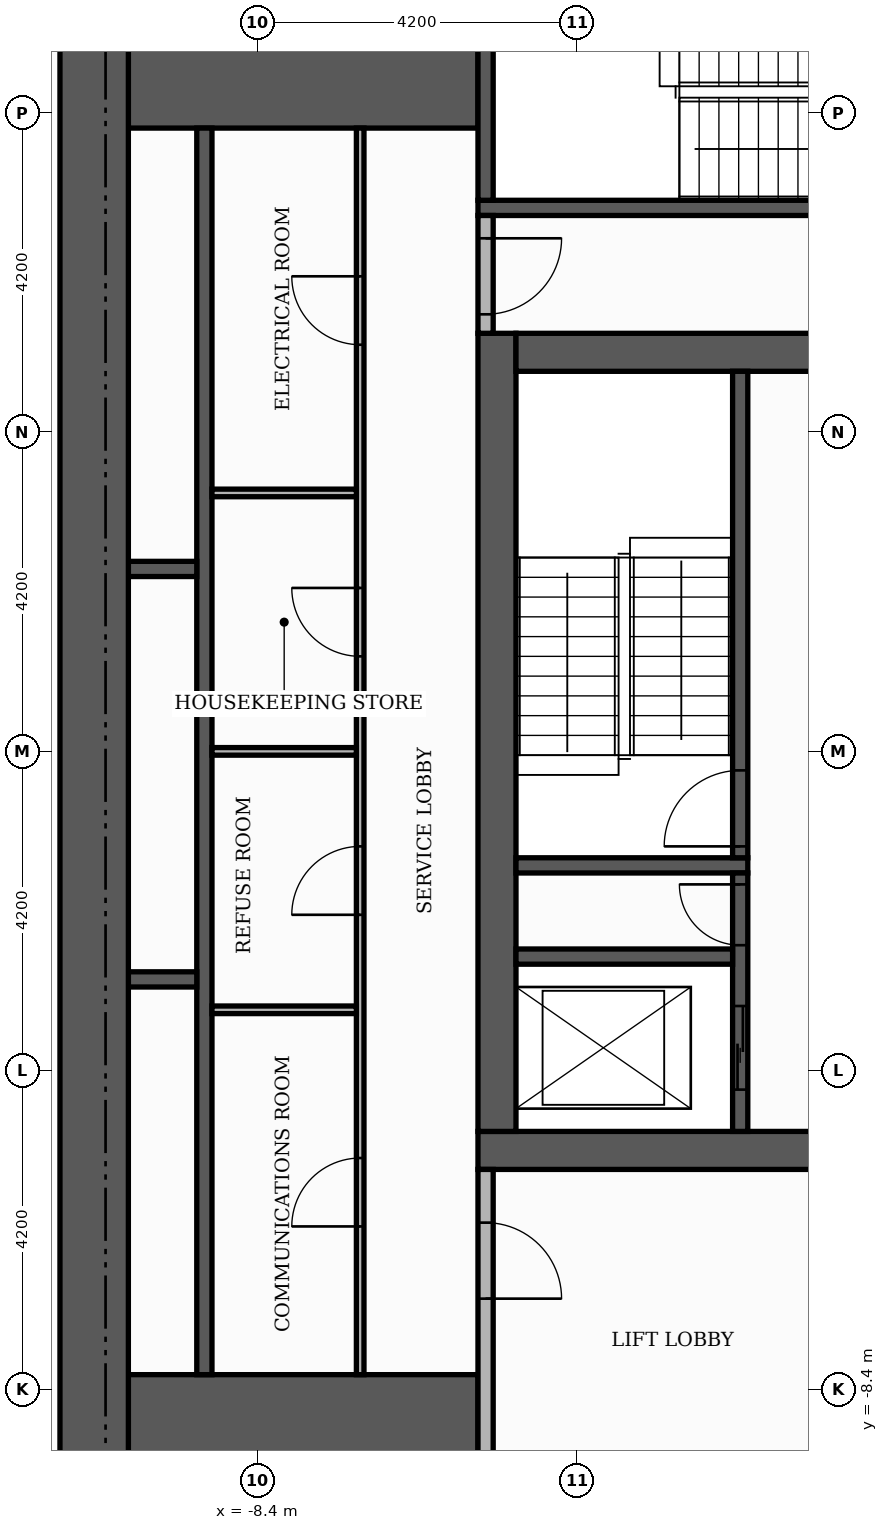
"""IFC4 building model, lengths in metres.
Left out: names, types, materials, properties, quantities, classifications, styles, units other than length and angle.
Written with IfcOpenShell. Run it as: python <this file> out.ifc"""

import sys

from ifc_helpers import new_model, si_unit, direction, frame, frame_2d, origin, place, context, subcontext, project, spatial, rectangle, extrude, element, fill, save


model = new_model("IFC4")
c1 = context("Model", 3, precision=1e-05, world=origin(), true_north=direction((0.0, 1.0)))
c2 = subcontext(c1, "Body", "Model", "MODEL_VIEW")
j1 = project(units=[si_unit("LENGTHUNIT", "METRE"), si_unit("PLANEANGLEUNIT", "RADIAN")], contexts=[c1])
p1 = place(None, origin())
s1 = spatial("IfcSite", under=j1, at=p1, CompositionType="ELEMENT")
p2 = place(p1, origin())
s2 = spatial("IfcBuilding", under=s1, at=p2, CompositionType="ELEMENT")
p3 = place(p2, frame((0.0, 0.0, 215.7)))
s3 = spatial("IfcBuildingStorey", under=s2, at=p3, CompositionType="ELEMENT", Elevation=215.7)
p4 = place(p3, frame((-5.5, -5.25, 0.0), z_axis=(0.0, 0.0, 1.0), x_axis=(1.0, 0.0, 0.0)))
e1 = element("IfcWall", 1, at=p4, inside=s3, PredefinedType="SHEAR", context=c2, shape_type="SweptSolid", body=[
    extrude(rectangle(XDim=11.0, YDim=0.5, at=frame_2d((5.5, 0.0))), origin(), (0.0, 0.0, 1.0), 3.48),
])
p5 = place(p4, frame((4.9, 0.0, 0.0)))
e2 = element("IfcOpeningElement", 2, at=p5, cuts=e1, PredefinedType="OPENING", context=c2, shape_type="SweptSolid", body=[
    extrude(rectangle(XDim=1.2, YDim=2.1, at=frame_2d((0.6, 1.05))), frame((0.0, 0.26, 0.0), z_axis=(0.0, -1.0, 0.0), x_axis=(1.0, 0.0, 0.0)), (0.0, 0.0, 1.0), 0.52),
])
p6 = place(p3, frame((-5.25, -5.0, 0.0), z_axis=(0.0, 0.0, 1.0), x_axis=(0.0, 1.0, 0.0)))
e3 = element("IfcWall", 3, at=p6, inside=s3, PredefinedType="SHEAR", context=c2, shape_type="SweptSolid", body=[
    extrude(rectangle(XDim=10.5, YDim=0.5, at=frame_2d((5.25, 0.0))), origin(), (0.0, 0.0, 1.0), 3.48),
])
p7 = place(p3, frame((-5.0, 5.25, 0.0), z_axis=(0.0, 0.0, 1.0), x_axis=(1.0, 0.0, 0.0)))
e4 = element("IfcWall", 4, at=p7, inside=s3, PredefinedType="SHEAR", context=c2, shape_type="SweptSolid", body=[
    extrude(rectangle(XDim=10.0, YDim=0.5, at=frame_2d((5.0, 0.0))), origin(), (0.0, 0.0, 1.0), 3.48),
])
p8 = place(p7, frame((4.4, 0.0, 0.0)))
e5 = element("IfcOpeningElement", 5, at=p8, cuts=e4, PredefinedType="OPENING", context=c2, shape_type="SweptSolid", body=[
    extrude(rectangle(XDim=1.2, YDim=2.1, at=frame_2d((0.6, 1.05))), frame((0.0, 0.26, 0.0), z_axis=(0.0, -1.0, 0.0), x_axis=(1.0, 0.0, 0.0)), (0.0, 0.0, 1.0), 0.52),
])
for number, where, z_axis, x_axis in (
    (6, (-10.1, -9.15, 0.0), (0.0, 0.0, 1.0), (1.0, 0.0, 0.0)),
    (7, (-10.1, 9.15, 0.0), (0.0, 0.0, 1.0), (1.0, 0.0, 0.0)),
):
    element("IfcWall", number, at=place(p3, frame(where, z_axis=z_axis, x_axis=x_axis)), inside=s3, PredefinedType="SHEAR", context=c2, shape_type="SweptSolid", body=[
        extrude(rectangle(XDim=4.6, YDim=1.9, at=frame_2d((2.3, 0.0))), origin(), (0.0, 0.0, 1.0), 3.48),
    ])
p9 = place(p3, frame((-5.0, -1.5, 0.0), z_axis=(0.0, 0.0, 1.0), x_axis=(1.0, 0.0, 0.0)))
e8 = element("IfcWall", 8, at=p9, inside=s3, PredefinedType="SHEAR", context=c2, shape_type="SweptSolid", body=[
    extrude(rectangle(XDim=3.05, YDim=0.2, at=frame_2d((1.525, 0.0))), origin(), (0.0, 0.0, 1.0), 3.48),
])
p10 = place(p3, frame((-2.05, -1.4, 0.0), z_axis=(0.0, 0.0, 1.0), x_axis=(0.0, 1.0, 0.0)))
e9 = element("IfcWall", 9, at=p10, inside=s3, PredefinedType="SHEAR", context=c2, shape_type="SweptSolid", body=[
    extrude(rectangle(XDim=6.4, YDim=0.2, at=frame_2d((3.2, 0.0))), origin(), (0.0, 0.0, 1.0), 3.48),
])
p11 = place(p10, frame((0.15, 0.0, 0.0)))
e10 = element("IfcOpeningElement", 10, at=p11, cuts=e9, PredefinedType="OPENING", context=c2, shape_type="SweptSolid", body=[
    extrude(rectangle(XDim=1.0, YDim=2.1, at=frame_2d((0.5, 1.05))), frame((0.0, 0.11, 0.0), z_axis=(0.0, -1.0, 0.0), x_axis=(1.0, 0.0, 0.0)), (0.0, 0.0, 1.0), 0.22),
])
p12 = place(p3, frame((-5.5, 7.15, 0.0), z_axis=(0.0, 0.0, 1.0), x_axis=(1.0, 0.0, 0.0)))
e11 = element("IfcWall", 11, at=p12, inside=s3, PredefinedType="SHEAR", context=c2, shape_type="SweptSolid", body=[
    extrude(rectangle(XDim=6.8, YDim=0.2, at=frame_2d((3.4, 0.0))), origin(), (0.0, 0.0, 1.0), 3.48),
])
p13 = place(p3, frame((-5.4, 7.25, 0.0), z_axis=(0.0, 0.0, 1.0), x_axis=(0.0, 1.0, 0.0)))
e12 = element("IfcWall", 12, at=p13, inside=s3, PredefinedType="SHEAR", context=c2, shape_type="SweptSolid", body=[
    extrude(rectangle(XDim=2.85, YDim=0.2, at=frame_2d((1.425, 0.0))), origin(), (0.0, 0.0, 1.0), 3.48),
])
p14 = place(p3, frame((-9.1, -8.2, 0.0), z_axis=(0.0, 0.0, 1.0), x_axis=(0.0, 1.0, 0.0)))
e13 = element("IfcWall", 13, at=p14, inside=s3, PredefinedType="SHEAR", context=c2, shape_type="SweptSolid", body=[
    extrude(rectangle(XDim=16.4, YDim=0.2, at=frame_2d((8.2, 0.0))), origin(), (0.0, 0.0, 1.0), 3.48),
])
p15 = place(p3, frame((-2.05, -5.0, 0.0), z_axis=(0.0, 0.0, 1.0), x_axis=(0.0, 1.0, 0.0)))
e14 = element("IfcWall", 14, at=p15, inside=s3, PredefinedType="SHEAR", context=c2, shape_type="SweptSolid", body=[
    extrude(rectangle(XDim=3.4, YDim=0.2, at=frame_2d((1.7, 0.0))), origin(), (0.0, 0.0, 1.0), 3.48),
])
p16 = place(p15, frame((0.55, 0.0, 0.0)))
e15 = element("IfcOpeningElement", 15, at=p16, cuts=e14, PredefinedType="OPENING", context=c2, shape_type="SweptSolid", body=[
    extrude(rectangle(XDim=1.1, YDim=2.1, at=frame_2d((0.55, 1.05))), frame((0.0, 0.11, 0.0), z_axis=(0.0, -1.0, 0.0), x_axis=(1.0, 0.0, 0.0)), (0.0, 0.0, 1.0), 0.22),
])
p17 = place(p15, frame((2.45, 0.0, 0.0)))
e16 = element("IfcOpeningElement", 16, at=p17, cuts=e14, PredefinedType="OPENING", context=c2, shape_type="SweptSolid", body=[
    extrude(rectangle(XDim=0.8, YDim=2.1, at=frame_2d((0.4, 1.05))), frame((0.0, 0.11, 0.0), z_axis=(0.0, -1.0, 0.0), x_axis=(1.0, 0.0, 0.0)), (0.0, 0.0, 1.0), 0.22),
])
p18 = place(p3, frame((-10.1, -3.0, 0.0), z_axis=(0.0, 0.0, 1.0), x_axis=(1.0, 0.0, 0.0)))
e17 = element("IfcWall", 17, at=p18, inside=s3, PredefinedType="SHEAR", context=c2, shape_type="SweptSolid", body=[
    extrude(rectangle(XDim=0.9, YDim=0.2, at=frame_2d((0.45, 0.0))), origin(), (0.0, 0.0, 1.0), 3.48),
])
p19 = place(p3, frame((-5.0, -2.7, 0.0), z_axis=(0.0, 0.0, 1.0), x_axis=(1.0, 0.0, 0.0)))
e18 = element("IfcWall", 18, at=p19, inside=s3, PredefinedType="SHEAR", context=c2, shape_type="SweptSolid", body=[
    extrude(rectangle(XDim=2.85, YDim=0.2, at=frame_2d((1.425, 0.0))), origin(), (0.0, 0.0, 1.0), 3.48),
])
p20 = place(p3, frame((-10.1, 2.4, 0.0), z_axis=(0.0, 0.0, 1.0), x_axis=(1.0, 0.0, 0.0)))
e19 = element("IfcWall", 19, at=p20, inside=s3, PredefinedType="SHEAR", context=c2, shape_type="SweptSolid", body=[
    extrude(rectangle(XDim=0.9, YDim=0.2, at=frame_2d((0.45, 0.0))), origin(), (0.0, 0.0, 1.0), 3.48),
])
p21 = place(p3, frame((-10.55, -10.1, 0.0), z_axis=(0.0, 0.0, 1.0), x_axis=(0.0, 1.0, 0.0)))
e20 = element("IfcWall", 20, at=p21, inside=s3, PredefinedType="SHEAR", context=c2, shape_type="SweptSolid", body=[
    extrude(rectangle(XDim=20.2, YDim=0.9, at=frame_2d((10.1, 0.0))), origin(), (0.0, 0.0, 1.0), 3.48),
])
p22 = place(p3, frame((-5.4, -10.1, 0.0), z_axis=(0.0, 0.0, 1.0), x_axis=(0.0, 1.0, 0.0)))
e21 = element("IfcWall", 21, at=p22, inside=s3, PredefinedType="PARTITIONING", context=c2, shape_type="SweptSolid", body=[
    extrude(rectangle(XDim=4.6, YDim=0.2, at=frame_2d((2.3, 0.0))), origin(), (0.0, 0.0, 1.0), 3.48),
])
p23 = place(p22, frame((2.9, 0.0, 0.0)))
e22 = element("IfcOpeningElement", 22, at=p23, cuts=e21, PredefinedType="OPENING", context=c2, shape_type="SweptSolid", body=[
    extrude(rectangle(XDim=1.0, YDim=2.1, at=frame_2d((0.5, 1.05))), frame((0.0, 0.11, 0.0), z_axis=(0.0, -1.0, 0.0), x_axis=(1.0, 0.0, 0.0)), (0.0, 0.0, 1.0), 0.22),
])
p24 = place(p3, frame((-7.05, -8.2, 0.0), z_axis=(0.0, 0.0, 1.0), x_axis=(0.0, 1.0, 0.0)))
e23 = element("IfcWall", 23, at=p24, inside=s3, PredefinedType="PARTITIONING", context=c2, shape_type="SweptSolid", body=[
    extrude(rectangle(XDim=16.4, YDim=0.1, at=frame_2d((8.2, 0.0))), origin(), (0.0, 0.0, 1.0), 3.48),
])
p25 = place(p24, frame((1.95, 0.0, 0.0)))
e24 = element("IfcOpeningElement", 24, at=p25, cuts=e23, PredefinedType="OPENING", context=c2, shape_type="SweptSolid", body=[
    extrude(rectangle(XDim=0.9, YDim=2.1, at=frame_2d((0.45, 1.05))), frame((0.0, 0.06, 0.0), z_axis=(0.0, -1.0, 0.0), x_axis=(1.0, 0.0, 0.0)), (0.0, 0.0, 1.0), 0.12),
])
p26 = place(p24, frame((6.05, 0.0, 0.0)))
e25 = element("IfcOpeningElement", 25, at=p26, cuts=e23, PredefinedType="OPENING", context=c2, shape_type="SweptSolid", body=[
    extrude(rectangle(XDim=0.9, YDim=2.1, at=frame_2d((0.45, 1.05))), frame((0.0, 0.06, 0.0), z_axis=(0.0, -1.0, 0.0), x_axis=(1.0, 0.0, 0.0)), (0.0, 0.0, 1.0), 0.12),
])
p27 = place(p24, frame((9.45, 0.0, 0.0)))
e26 = element("IfcOpeningElement", 26, at=p27, cuts=e23, PredefinedType="OPENING", context=c2, shape_type="SweptSolid", body=[
    extrude(rectangle(XDim=0.9, YDim=2.1, at=frame_2d((0.45, 1.05))), frame((0.0, 0.06, 0.0), z_axis=(0.0, -1.0, 0.0), x_axis=(1.0, 0.0, 0.0)), (0.0, 0.0, 1.0), 0.12),
])
p28 = place(p24, frame((13.55, 0.0, 0.0)))
e27 = element("IfcOpeningElement", 27, at=p28, cuts=e23, PredefinedType="OPENING", context=c2, shape_type="SweptSolid", body=[
    extrude(rectangle(XDim=0.9, YDim=2.1, at=frame_2d((0.45, 1.05))), frame((0.0, 0.06, 0.0), z_axis=(0.0, -1.0, 0.0), x_axis=(1.0, 0.0, 0.0)), (0.0, 0.0, 1.0), 0.12),
])
for number, where, z_axis, x_axis in (
    (28, (-9.0, -3.4, 0.0), (0.0, 0.0, 1.0), (1.0, 0.0, 0.0)),
    (29, (-9.0, 0.0, 0.0), (0.0, 0.0, 1.0), (1.0, 0.0, 0.0)),
    (30, (-9.0, 3.4, 0.0), (0.0, 0.0, 1.0), (1.0, 0.0, 0.0)),
):
    element("IfcWall", number, at=place(p3, frame(where, z_axis=z_axis, x_axis=x_axis)), inside=s3, PredefinedType="PARTITIONING", context=c2, shape_type="SweptSolid", body=[
        extrude(rectangle(XDim=1.9, YDim=0.1, at=frame_2d((0.95, 0.0))), origin(), (0.0, 0.0, 1.0), 3.48),
    ])
p29 = place(p3, frame((-5.4, 5.5, 0.0), z_axis=(0.0, 0.0, 1.0), x_axis=(0.0, 1.0, 0.0)))
e31 = element("IfcWall", 31, at=p29, inside=s3, PredefinedType="PARTITIONING", context=c2, shape_type="SweptSolid", body=[
    extrude(rectangle(XDim=1.55, YDim=0.2, at=frame_2d((0.775, 0.0))), origin(), (0.0, 0.0, 1.0), 3.48),
])
p30 = place(p29, frame((0.25, 0.0, 0.0)))
e32 = element("IfcOpeningElement", 32, at=p30, cuts=e31, PredefinedType="OPENING", context=c2, shape_type="SweptSolid", body=[
    extrude(rectangle(XDim=1.0, YDim=2.1, at=frame_2d((0.5, 1.05))), frame((0.0, 0.11, 0.0), z_axis=(0.0, -1.0, 0.0), x_axis=(1.0, 0.0, 0.0)), (0.0, 0.0, 1.0), 0.22),
])
p31 = place(p16, origin())
e33 = element("IfcDoor", 33, at=p31, inside=s3, OperationType="SLIDING_TO_LEFT", PredefinedType="DOOR", context=c2, shape_type="SweptSolid", body=[
    extrude(rectangle(XDim=1.1, YDim=2.1, at=frame_2d((0.55, 1.05))), frame((0.0, 0.025, 0.0), z_axis=(0.0, -1.0, 0.0), x_axis=(1.0, 0.0, 0.0)), (0.0, 0.0, 1.0), 0.05),
])
fill(e15, e33)
p32 = place(p11, origin())
e34 = element("IfcDoor", 34, at=p32, inside=s3, OperationType="SINGLE_SWING_LEFT", PredefinedType="DOOR", context=c2, shape_type="SweptSolid", body=[
    extrude(rectangle(XDim=1.0, YDim=2.1, at=frame_2d((0.5, 1.05))), frame((0.0, 0.025, 0.0), z_axis=(0.0, -1.0, 0.0), x_axis=(1.0, 0.0, 0.0)), (0.0, 0.0, 1.0), 0.05),
])
fill(e10, e34)
p33 = place(p17, origin())
e35 = element("IfcDoor", 35, at=p33, inside=s3, OperationType="SINGLE_SWING_RIGHT", PredefinedType="DOOR", context=c2, shape_type="SweptSolid", body=[
    extrude(rectangle(XDim=0.8, YDim=2.1, at=frame_2d((0.4, 1.05))), frame((0.0, 0.025, 0.0), z_axis=(0.0, -1.0, 0.0), x_axis=(1.0, 0.0, 0.0)), (0.0, 0.0, 1.0), 0.05),
])
fill(e16, e35)
p34 = place(p30, frame((1.0, 0.0, 0.0), z_axis=(0.0, 0.0, 1.0), x_axis=(-1.0, 0.0, 0.0)))
e36 = element("IfcDoor", 36, at=p34, inside=s3, OperationType="SINGLE_SWING_RIGHT", PredefinedType="DOOR", context=c2, shape_type="SweptSolid", body=[
    extrude(rectangle(XDim=1.0, YDim=2.1, at=frame_2d((0.5, 1.05))), frame((0.0, 0.025, 0.0), z_axis=(0.0, -1.0, 0.0), x_axis=(1.0, 0.0, 0.0)), (0.0, 0.0, 1.0), 0.05),
])
fill(e32, e36)
p35 = place(p23, frame((1.0, 0.0, 0.0), z_axis=(0.0, 0.0, 1.0), x_axis=(-1.0, 0.0, 0.0)))
e37 = element("IfcDoor", 37, at=p35, inside=s3, OperationType="SINGLE_SWING_LEFT", PredefinedType="DOOR", context=c2, shape_type="SweptSolid", body=[
    extrude(rectangle(XDim=1.0, YDim=2.1, at=frame_2d((0.5, 1.05))), frame((0.0, 0.025, 0.0), z_axis=(0.0, -1.0, 0.0), x_axis=(1.0, 0.0, 0.0)), (0.0, 0.0, 1.0), 0.05),
])
fill(e22, e37)
p36 = place(p25, origin())
e38 = element("IfcDoor", 38, at=p36, inside=s3, OperationType="SINGLE_SWING_LEFT", PredefinedType="DOOR", context=c2, shape_type="SweptSolid", body=[
    extrude(rectangle(XDim=0.9, YDim=2.1, at=frame_2d((0.45, 1.05))), frame((0.0, 0.025, 0.0), z_axis=(0.0, -1.0, 0.0), x_axis=(1.0, 0.0, 0.0)), (0.0, 0.0, 1.0), 0.05),
])
fill(e24, e38)
p37 = place(p26, origin())
e39 = element("IfcDoor", 39, at=p37, inside=s3, OperationType="SINGLE_SWING_LEFT", PredefinedType="DOOR", context=c2, shape_type="SweptSolid", body=[
    extrude(rectangle(XDim=0.9, YDim=2.1, at=frame_2d((0.45, 1.05))), frame((0.0, 0.025, 0.0), z_axis=(0.0, -1.0, 0.0), x_axis=(1.0, 0.0, 0.0)), (0.0, 0.0, 1.0), 0.05),
])
fill(e25, e39)
p38 = place(p27, origin())
e40 = element("IfcDoor", 40, at=p38, inside=s3, OperationType="SINGLE_SWING_RIGHT", PredefinedType="DOOR", context=c2, shape_type="SweptSolid", body=[
    extrude(rectangle(XDim=0.9, YDim=2.1, at=frame_2d((0.45, 1.05))), frame((0.0, 0.025, 0.0), z_axis=(0.0, -1.0, 0.0), x_axis=(1.0, 0.0, 0.0)), (0.0, 0.0, 1.0), 0.05),
])
fill(e26, e40)
p39 = place(p28, origin())
e41 = element("IfcDoor", 41, at=p39, inside=s3, OperationType="SINGLE_SWING_RIGHT", PredefinedType="DOOR", context=c2, shape_type="SweptSolid", body=[
    extrude(rectangle(XDim=0.9, YDim=2.1, at=frame_2d((0.45, 1.05))), frame((0.0, 0.025, 0.0), z_axis=(0.0, -1.0, 0.0), x_axis=(1.0, 0.0, 0.0)), (0.0, 0.0, 1.0), 0.05),
])
fill(e27, e41)
save(model, sys.argv[1])
